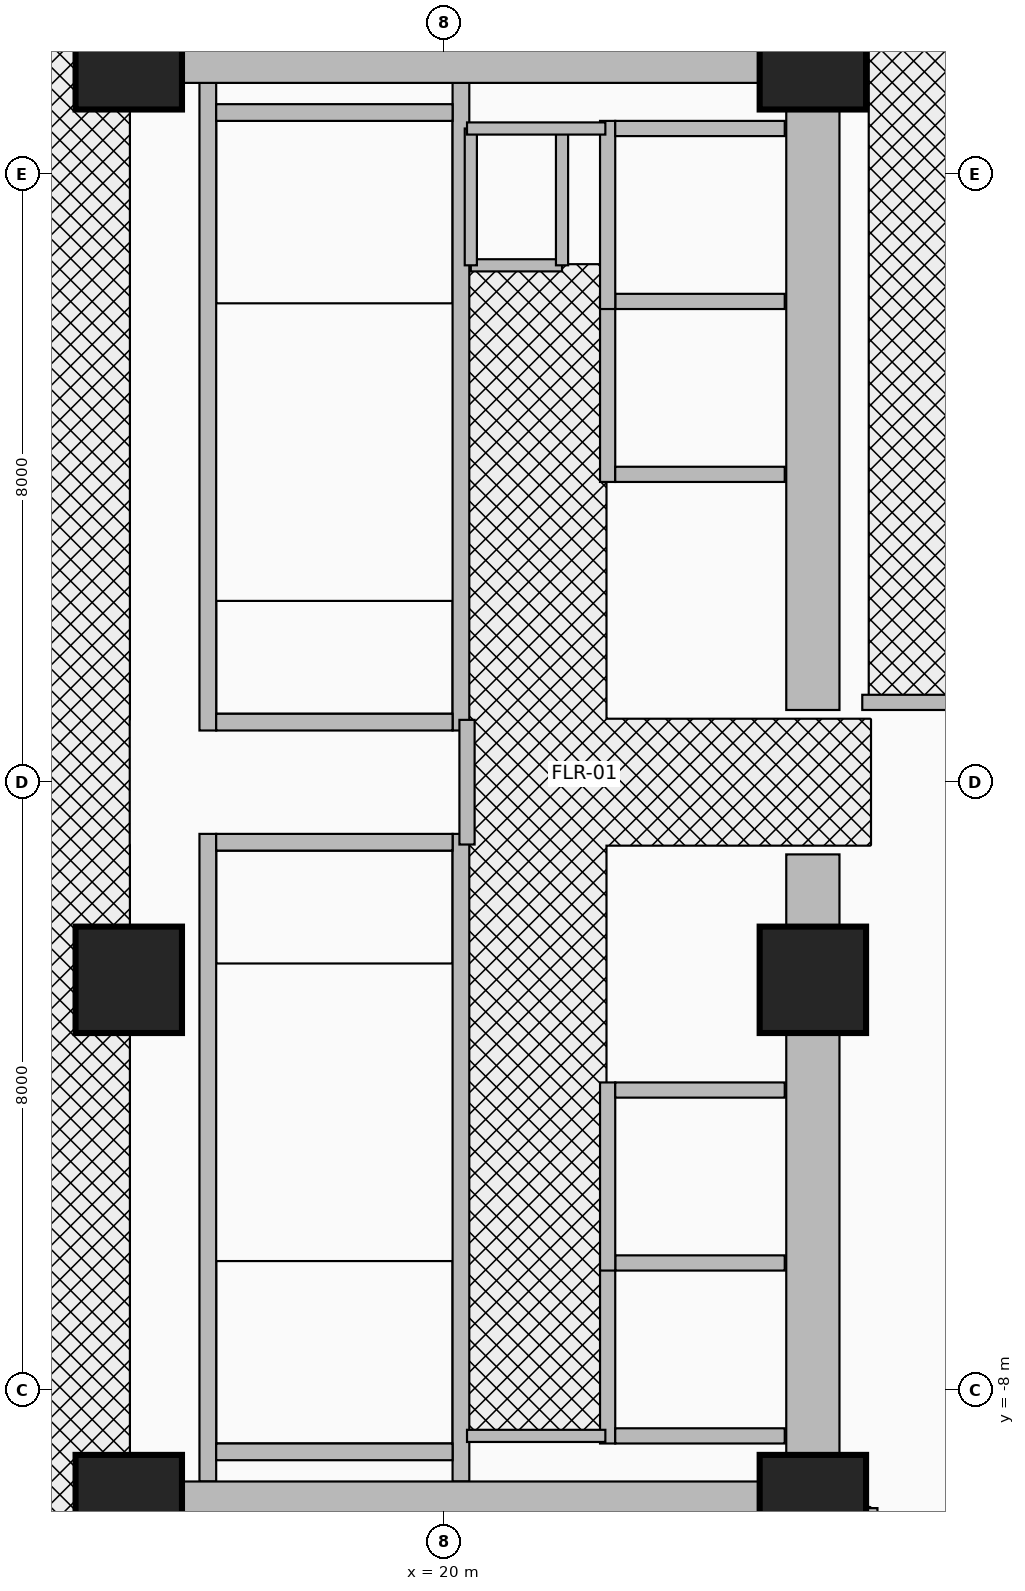
"""IFC4 building model, lengths in metres.
Left out: names, types, materials, properties, quantities, classifications, styles, units other than length and angle.
Written with IfcOpenShell. Run it as: python <this file> out.ifc"""

import sys

from ifc_helpers import new_model, si_unit, direction, frame, frame_2d, origin, origin_2d, place, context, subcontext, project, spatial, rectangle, extrude, source, transform, mapped, element, fill, save


model = new_model("IFC4")
c1 = context("Model", 3, precision=1e-05, world=origin(), true_north=direction((0.0, 1.0)))
c2 = subcontext(c1, "Body", "Model", "MODEL_VIEW")
j1 = project(units=[si_unit("LENGTHUNIT", "METRE"), si_unit("PLANEANGLEUNIT", "RADIAN")], contexts=[c1])
p1 = place(None, origin())
s1 = spatial("IfcSite", under=j1, at=p1, CompositionType="ELEMENT")
p2 = place(p1, origin())
s2 = spatial("IfcBuilding", under=s1, at=p2, CompositionType="ELEMENT")
p3 = place(p2, origin())
s3 = spatial("IfcBuildingStorey", under=s2, at=p3, CompositionType="ELEMENT", Elevation=0.0)
for number, where, z_axis, x_axis in (
    (1, (16.89, 0.68, 0.0), (0.0, 0.0, 1.0), (0.0, 1.0, 0.0)),
    (2, (20.22, 0.68, 0.0), (0.0, 0.0, 1.0), (0.0, 1.0, 0.0)),
):
    element("IfcWall", number, at=place(p3, frame(where, z_axis=z_axis, x_axis=x_axis)), inside=s3, PredefinedType="SHEAR", context=c2, shape_type="SweptSolid", body=[
        extrude(rectangle(XDim=8.52, YDim=0.22, at=frame_2d((4.26, 0.0))), origin(), (0.0, 0.0, 1.0), 4.92),
    ])
p4 = place(p3, frame((17.0, 0.79, 0.0), z_axis=(0.0, 0.0, 1.0), x_axis=(1.0, 0.0, 0.0)))
e3 = element("IfcWall", 3, at=p4, inside=s3, PredefinedType="SHEAR", context=c2, shape_type="SweptSolid", body=[
    extrude(rectangle(XDim=3.11, YDim=0.22, at=frame_2d((1.555, 0.0))), origin(), (0.0, 0.0, 1.0), 4.92),
])
p5 = place(p4, frame((0.95, 0.0, 0.0)))
e4 = element("IfcOpeningElement", 4, at=p5, cuts=e3, PredefinedType="OPENING", context=c2, shape_type="SweptSolid", body=[
    extrude(rectangle(XDim=1.1, YDim=2.15, at=frame_2d((0.55, 1.075))), frame((0.0, 0.125, 0.0), z_axis=(0.0, -1.0, 0.0), x_axis=(1.0, 0.0, 0.0)), (0.0, 0.0, 1.0), 0.25),
])
p6 = place(p3, frame((17.0, 8.81, 0.0), z_axis=(0.0, 0.0, 1.0), x_axis=(1.0, 0.0, 0.0)))
e5 = element("IfcWall", 5, at=p6, inside=s3, PredefinedType="SHEAR", context=c2, shape_type="SweptSolid", body=[
    extrude(rectangle(XDim=3.11, YDim=0.22, at=frame_2d((1.555, 0.0))), origin(), (0.0, 0.0, 1.0), 4.92),
])
for number, where, z_axis, x_axis in (
    (6, (16.89, -9.2, 0.0), (0.0, 0.0, 1.0), (0.0, 1.0, 0.0)),
    (7, (20.22, -9.2, 0.0), (0.0, 0.0, 1.0), (0.0, 1.0, 0.0)),
):
    element("IfcWall", number, at=place(p3, frame(where, z_axis=z_axis, x_axis=x_axis)), inside=s3, PredefinedType="SHEAR", context=c2, shape_type="SweptSolid", body=[
        extrude(rectangle(XDim=8.52, YDim=0.22, at=frame_2d((4.26, 0.0))), origin(), (0.0, 0.0, 1.0), 4.92),
    ])
p7 = place(p3, frame((17.0, -8.81, 0.0), z_axis=(0.0, 0.0, 1.0), x_axis=(1.0, 0.0, 0.0)))
e8 = element("IfcWall", 8, at=p7, inside=s3, PredefinedType="SHEAR", context=c2, shape_type="SweptSolid", body=[
    extrude(rectangle(XDim=3.11, YDim=0.22, at=frame_2d((1.555, 0.0))), origin(), (0.0, 0.0, 1.0), 4.92),
])
p8 = place(p3, frame((17.0, -0.79, 0.0), z_axis=(0.0, 0.0, 1.0), x_axis=(1.0, 0.0, 0.0)))
e9 = element("IfcWall", 9, at=p8, inside=s3, PredefinedType="SHEAR", context=c2, shape_type="SweptSolid", body=[
    extrude(rectangle(XDim=3.11, YDim=0.22, at=frame_2d((1.555, 0.0))), origin(), (0.0, 0.0, 1.0), 4.92),
])
p9 = place(p8, frame((0.95, 0.0, 0.0)))
e10 = element("IfcOpeningElement", 10, at=p9, cuts=e9, PredefinedType="OPENING", context=c2, shape_type="SweptSolid", body=[
    extrude(rectangle(XDim=1.1, YDim=2.15, at=frame_2d((0.55, 1.075))), frame((0.0, 0.125, 0.0), z_axis=(0.0, -1.0, 0.0), x_axis=(1.0, 0.0, 0.0)), (0.0, 0.0, 1.0), 0.25),
])
for number, where, z_axis, x_axis in (
    (11, (24.85, -9.9, 0.0), (0.0, 0.0, 1.0), (0.0, 1.0, 0.0)),
    (12, (24.85, 0.95, 0.0), (0.0, 0.0, 1.0), (0.0, 1.0, 0.0)),
):
    element("IfcWall", number, at=place(p3, frame(where, z_axis=z_axis, x_axis=x_axis)), inside=s3, PredefinedType="SHEAR", context=c2, shape_type="SweptSolid", body=[
        extrude(rectangle(XDim=8.95, YDim=0.7, at=frame_2d((4.475, 0.0))), origin(), (0.0, 0.0, 1.0), 4.92),
    ])
for number, where, z_axis, x_axis in (
    (13, (15.85, 9.55, 0.0), (0.0, 0.0, 1.0), (1.0, 0.0, 0.0)),
    (14, (15.85, -9.55, 0.0), (0.0, 0.0, 1.0), (1.0, 0.0, 0.0)),
):
    element("IfcWall", number, at=place(p3, frame(where, z_axis=z_axis, x_axis=x_axis)), inside=s3, PredefinedType="SHEAR", context=c2, shape_type="SweptSolid", body=[
        extrude(rectangle(XDim=9.0, YDim=0.7, at=frame_2d((4.5, 0.0))), origin(), (0.0, 0.0, 1.0), 4.92),
    ])
m1 = source(origin(), c2, "Body", "SweptSolid", [
    extrude(rectangle(XDim=1.4, YDim=1.4, at=origin_2d()), origin(), (0.0, 0.0, 1.0), 5.2),
])
for number, where, z_axis, x_axis in (
    (15, (15.85, -9.55, 0.0), (0.0, 0.0, 1.0), (1.0, 0.0, 0.0)),
    (16, (24.85, -9.55, 0.0), (0.0, 0.0, 1.0), (1.0, 0.0, 0.0)),
    (17, (15.85, -2.6, 0.0), (0.0, 0.0, 1.0), (1.0, 0.0, 0.0)),
    (18, (24.85, -2.6, 0.0), (0.0, 0.0, 1.0), (1.0, 0.0, 0.0)),
    (19, (15.85, 9.55, 0.0), (0.0, 0.0, 1.0), (1.0, 0.0, 0.0)),
    (20, (24.85, 9.55, 0.0), (0.0, 0.0, 1.0), (1.0, 0.0, 0.0)),
):
    element("IfcColumn", number, at=place(p3, frame(where, z_axis=z_axis, x_axis=x_axis)), inside=s3, PredefinedType="COLUMN", context=c2, shape_type="MappedRepresentation", body=[
        mapped(m1, transform((0.0, 0.0, 0.0), x_axis=(1.0, 0.0, 0.0), y_axis=(0.0, 1.0, 0.0), z_axis=(0.0, 0.0, 1.0), scale=1.0)),
    ])
p10 = place(p3, frame((22.15, -8.7, 0.0), z_axis=(0.0, 0.0, 1.0), x_axis=(0.0, 1.0, 0.0)))
e21 = element("IfcWall", 21, at=p10, inside=s3, PredefinedType="MOVABLE", context=c2, shape_type="SweptSolid", body=[
    extrude(rectangle(XDim=2.475, YDim=0.2, at=frame_2d((1.237, 0.0))), origin(), (0.0, 0.0, 1.0), 4.92),
])
p11 = place(p10, frame((0.688, 0.0, 0.0)))
e22 = element("IfcOpeningElement", 22, at=p11, cuts=e21, PredefinedType="OPENING", context=c2, shape_type="SweptSolid", body=[
    extrude(rectangle(XDim=1.1, YDim=2.1, at=frame_2d((0.55, 1.05))), frame((0.0, 0.115, 0.0), z_axis=(0.0, -1.0, 0.0), x_axis=(1.0, 0.0, 0.0)), (0.0, 0.0, 1.0), 0.23),
])
for number, where, z_axis, x_axis in (
    (23, (22.25, -8.6, 0.0), (0.0, 0.0, 1.0), (1.0, 0.0, 0.0)),
    (24, (22.25, -6.325, 0.0), (0.0, 0.0, 1.0), (1.0, 0.0, 0.0)),
):
    element("IfcWall", number, at=place(p3, frame(where, z_axis=z_axis, x_axis=x_axis)), inside=s3, PredefinedType="MOVABLE", context=c2, shape_type="SweptSolid", body=[
        extrude(rectangle(XDim=2.23, YDim=0.2, at=frame_2d((1.115, 0.0))), origin(), (0.0, 0.0, 1.0), 4.92),
    ])
p12 = place(p3, frame((22.15, -6.425, 0.0), z_axis=(0.0, 0.0, 1.0), x_axis=(0.0, 1.0, 0.0)))
e25 = element("IfcWall", 25, at=p12, inside=s3, PredefinedType="MOVABLE", context=c2, shape_type="SweptSolid", body=[
    extrude(rectangle(XDim=2.475, YDim=0.2, at=frame_2d((1.238, 0.0))), origin(), (0.0, 0.0, 1.0), 4.92),
])
p13 = place(p12, frame((0.688, 0.0, 0.0)))
e26 = element("IfcOpeningElement", 26, at=p13, cuts=e25, PredefinedType="OPENING", context=c2, shape_type="SweptSolid", body=[
    extrude(rectangle(XDim=1.1, YDim=2.1, at=frame_2d((0.55, 1.05))), frame((0.0, 0.115, 0.0), z_axis=(0.0, -1.0, 0.0), x_axis=(1.0, 0.0, 0.0)), (0.0, 0.0, 1.0), 0.23),
])
p14 = place(p3, frame((22.25, -4.05, 0.0), z_axis=(0.0, 0.0, 1.0), x_axis=(1.0, 0.0, 0.0)))
e27 = element("IfcWall", 27, at=p14, inside=s3, PredefinedType="MOVABLE", context=c2, shape_type="SweptSolid", body=[
    extrude(rectangle(XDim=2.23, YDim=0.2, at=frame_2d((1.115, 0.0))), origin(), (0.0, 0.0, 1.0), 4.92),
])
p15 = place(p3, frame((22.15, 3.95, 0.0), z_axis=(0.0, 0.0, 1.0), x_axis=(0.0, 1.0, 0.0)))
e28 = element("IfcWall", 28, at=p15, inside=s3, PredefinedType="MOVABLE", context=c2, shape_type="SweptSolid", body=[
    extrude(rectangle(XDim=2.475, YDim=0.2, at=frame_2d((1.238, 0.0))), origin(), (0.0, 0.0, 1.0), 4.92),
])
p16 = place(p15, frame((0.688, 0.0, 0.0)))
e29 = element("IfcOpeningElement", 29, at=p16, cuts=e28, PredefinedType="OPENING", context=c2, shape_type="SweptSolid", body=[
    extrude(rectangle(XDim=1.1, YDim=2.1, at=frame_2d((0.55, 1.05))), frame((0.0, 0.115, 0.0), z_axis=(0.0, -1.0, 0.0), x_axis=(1.0, 0.0, 0.0)), (0.0, 0.0, 1.0), 0.23),
])
for number, where, z_axis, x_axis in (
    (30, (22.25, 4.05, 0.0), (0.0, 0.0, 1.0), (1.0, 0.0, 0.0)),
    (31, (22.25, 6.325, 0.0), (0.0, 0.0, 1.0), (1.0, 0.0, 0.0)),
):
    element("IfcWall", number, at=place(p3, frame(where, z_axis=z_axis, x_axis=x_axis)), inside=s3, PredefinedType="MOVABLE", context=c2, shape_type="SweptSolid", body=[
        extrude(rectangle(XDim=2.23, YDim=0.2, at=frame_2d((1.115, 0.0))), origin(), (0.0, 0.0, 1.0), 3.745),
    ])
p17 = place(p3, frame((22.15, 6.225, 0.0), z_axis=(0.0, 0.0, 1.0), x_axis=(0.0, 1.0, 0.0)))
e32 = element("IfcWall", 32, at=p17, inside=s3, PredefinedType="MOVABLE", context=c2, shape_type="SweptSolid", body=[
    extrude(rectangle(XDim=2.475, YDim=0.2, at=frame_2d((1.237, 0.0))), origin(), (0.0, 0.0, 1.0), 4.92),
])
p18 = place(p17, frame((0.688, 0.0, 0.0)))
e33 = element("IfcOpeningElement", 33, at=p18, cuts=e32, PredefinedType="OPENING", context=c2, shape_type="SweptSolid", body=[
    extrude(rectangle(XDim=1.1, YDim=2.1, at=frame_2d((0.55, 1.05))), frame((0.0, 0.115, 0.0), z_axis=(0.0, -1.0, 0.0), x_axis=(1.0, 0.0, 0.0)), (0.0, 0.0, 1.0), 0.23),
])
p19 = place(p3, frame((22.25, 8.6, 0.0), z_axis=(0.0, 0.0, 1.0), x_axis=(1.0, 0.0, 0.0)))
e34 = element("IfcWall", 34, at=p19, inside=s3, PredefinedType="MOVABLE", context=c2, shape_type="SweptSolid", body=[
    extrude(rectangle(XDim=2.23, YDim=0.2, at=frame_2d((1.115, 0.0))), origin(), (0.0, 0.0, 1.0), 3.745),
])
p20 = place(p3, frame((20.3, -0.82, 0.0), z_axis=(0.0, 0.0, 1.0), x_axis=(0.0, 1.0, 0.0)))
e35 = element("IfcWall", 35, at=p20, inside=s3, PredefinedType="PARTITIONING", context=c2, shape_type="SweptSolid", body=[
    extrude(rectangle(XDim=1.64, YDim=0.2, at=frame_2d((0.82, 0.0))), origin(), (0.0, 0.0, 1.0), 4.92),
])
p21 = place(p20, frame((0.295, 0.0, 0.0)))
e36 = element("IfcOpeningElement", 36, at=p21, cuts=e35, PredefinedType="OPENING", context=c2, shape_type="SweptSolid", body=[
    extrude(rectangle(XDim=1.05, YDim=2.15, at=frame_2d((0.525, 1.075))), frame((0.0, 0.115, 0.0), z_axis=(0.0, -1.0, 0.0), x_axis=(1.0, 0.0, 0.0)), (0.0, 0.0, 1.0), 0.23),
])
p22 = place(p3, frame((20.35, 6.8, 0.0), z_axis=(0.0, 0.0, 1.0), x_axis=(1.0, 0.0, 0.0)))
e37 = element("IfcWall", 37, at=p22, inside=s3, PredefinedType="PARTITIONING", context=c2, shape_type="SweptSolid", body=[
    extrude(rectangle(XDim=1.2, YDim=0.16, at=frame_2d((0.6, 0.0))), origin(), (0.0, 0.0, 1.0), 4.92),
])
p23 = place(p22, frame((0.175, 0.0, 0.0)))
e38 = element("IfcOpeningElement", 38, at=p23, cuts=e37, PredefinedType="OPENING", context=c2, shape_type="SweptSolid", body=[
    extrude(rectangle(XDim=0.85, YDim=2.05, at=frame_2d((0.425, 1.025))), frame((0.0, 0.095, 0.0), z_axis=(0.0, -1.0, 0.0), x_axis=(1.0, 0.0, 0.0)), (0.0, 0.0, 1.0), 0.19),
])
for number, where, z_axis, x_axis in (
    (39, (21.55, 6.8, 0.0), (0.0, 0.0, 1.0), (0.0, 1.0, 0.0)),
    (40, (20.35, 6.8, 0.0), (0.0, 0.0, 1.0), (0.0, 1.0, 0.0)),
):
    element("IfcWall", number, at=place(p3, frame(where, z_axis=z_axis, x_axis=x_axis)), inside=s3, PredefinedType="PARTITIONING", context=c2, shape_type="SweptSolid", body=[
        extrude(rectangle(XDim=1.8, YDim=0.16, at=frame_2d((0.9, 0.0))), origin(), (0.0, 0.0, 1.0), 4.92),
    ])
for number, where, z_axis, x_axis in (
    (41, (20.3, -8.6, 0.0), (0.0, 0.0, 1.0), (1.0, 0.0, 0.0)),
    (42, (20.3, 8.6, 0.0), (0.0, 0.0, 1.0), (1.0, 0.0, 0.0)),
):
    element("IfcWall", number, at=place(p3, frame(where, z_axis=z_axis, x_axis=x_axis)), inside=s3, PredefinedType="PARTITIONING", context=c2, shape_type="SweptSolid", body=[
        extrude(rectangle(XDim=1.82, YDim=0.16, at=frame_2d((0.91, 0.0))), origin(), (0.0, 0.0, 1.0), 4.92),
    ])
p24 = place(p3, frame((25.5, 1.05, 0.0), z_axis=(0.0, 0.0, 1.0), x_axis=(1.0, 0.0, 0.0)))
e43 = element("IfcWall", 43, at=p24, inside=s3, PredefinedType="PARTITIONING", context=c2, shape_type="SweptSolid", body=[
    extrude(rectangle(XDim=2.1, YDim=0.2, at=frame_2d((1.05, 0.0))), origin(), (0.0, 0.0, 1.0), 4.92),
])
p25 = place(p24, frame((0.5, 0.0, 0.0)))
e44 = element("IfcOpeningElement", 44, at=p25, cuts=e43, PredefinedType="OPENING", context=c2, shape_type="SweptSolid", body=[
    extrude(rectangle(XDim=1.05, YDim=2.15, at=frame_2d((0.525, 1.075))), frame((0.0, 0.115, 0.0), z_axis=(0.0, -1.0, 0.0), x_axis=(1.0, 0.0, 0.0)), (0.0, 0.0, 1.0), 0.23),
])
p26 = place(p3, frame((25.6, -22.74, 0.0), z_axis=(0.0, 0.0, 1.0), x_axis=(0.0, 1.0, 0.0)))
e45 = element("IfcWall", 45, at=p26, inside=s3, PredefinedType="PARTITIONING", context=c2, shape_type="SweptSolid", body=[
    extrude(rectangle(XDim=13.19, YDim=0.2, at=frame_2d((6.595, 0.0))), origin(), (0.0, 0.0, 1.0), 3.957),
])
p27 = place(p11, origin())
e46 = element("IfcDoor", 46, at=p27, inside=s3, OperationType="DOUBLE_DOOR_SLIDING", PredefinedType="DOOR", context=c2, shape_type="SweptSolid", body=[
    extrude(rectangle(XDim=1.1, YDim=2.1, at=frame_2d((0.55, 1.05))), frame((0.0, 0.025, 0.0), z_axis=(0.0, -1.0, 0.0), x_axis=(1.0, 0.0, 0.0)), (0.0, 0.0, 1.0), 0.05),
])
fill(e22, e46)
p28 = place(p13, origin())
e47 = element("IfcDoor", 47, at=p28, inside=s3, OperationType="DOUBLE_DOOR_SLIDING", PredefinedType="DOOR", context=c2, shape_type="SweptSolid", body=[
    extrude(rectangle(XDim=1.1, YDim=2.1, at=frame_2d((0.55, 1.05))), frame((0.0, 0.025, 0.0), z_axis=(0.0, -1.0, 0.0), x_axis=(1.0, 0.0, 0.0)), (0.0, 0.0, 1.0), 0.05),
])
fill(e26, e47)
p29 = place(p16, origin())
e48 = element("IfcDoor", 48, at=p29, inside=s3, OperationType="DOUBLE_DOOR_SLIDING", PredefinedType="DOOR", context=c2, shape_type="SweptSolid", body=[
    extrude(rectangle(XDim=1.1, YDim=2.1, at=frame_2d((0.55, 1.05))), frame((0.0, 0.025, 0.0), z_axis=(0.0, -1.0, 0.0), x_axis=(1.0, 0.0, 0.0)), (0.0, 0.0, 1.0), 0.05),
])
fill(e29, e48)
p30 = place(p18, origin())
e49 = element("IfcDoor", 49, at=p30, inside=s3, OperationType="DOUBLE_DOOR_SLIDING", PredefinedType="DOOR", context=c2, shape_type="SweptSolid", body=[
    extrude(rectangle(XDim=1.1, YDim=2.1, at=frame_2d((0.55, 1.05))), frame((0.0, 0.025, 0.0), z_axis=(0.0, -1.0, 0.0), x_axis=(1.0, 0.0, 0.0)), (0.0, 0.0, 1.0), 0.05),
])
fill(e33, e49)
p31 = place(p21, origin())
e50 = element("IfcDoor", 50, at=p31, inside=s3, OperationType="SINGLE_SWING_RIGHT", PredefinedType="DOOR", context=c2, shape_type="SweptSolid", body=[
    extrude(rectangle(XDim=1.05, YDim=2.15, at=frame_2d((0.525, 1.075))), frame((0.0, 0.025, 0.0), z_axis=(0.0, -1.0, 0.0), x_axis=(1.0, 0.0, 0.0)), (0.0, 0.0, 1.0), 0.05),
])
fill(e36, e50)
p32 = place(p5, frame((1.1, 0.0, 0.0), z_axis=(0.0, 0.0, 1.0), x_axis=(-1.0, 0.0, 0.0)))
e51 = element("IfcDoor", 51, at=p32, inside=s3, OperationType="SINGLE_SWING_LEFT", PredefinedType="DOOR", context=c2, shape_type="SweptSolid", body=[
    extrude(rectangle(XDim=1.1, YDim=2.15, at=frame_2d((0.55, 1.075))), frame((0.0, 0.025, 0.0), z_axis=(0.0, -1.0, 0.0), x_axis=(1.0, 0.0, 0.0)), (0.0, 0.0, 1.0), 0.05),
])
fill(e4, e51)
p33 = place(p9, origin())
e52 = element("IfcDoor", 52, at=p33, inside=s3, OperationType="SINGLE_SWING_RIGHT", PredefinedType="DOOR", context=c2, shape_type="SweptSolid", body=[
    extrude(rectangle(XDim=1.1, YDim=2.15, at=frame_2d((0.55, 1.075))), frame((0.0, 0.025, 0.0), z_axis=(0.0, -1.0, 0.0), x_axis=(1.0, 0.0, 0.0)), (0.0, 0.0, 1.0), 0.05),
])
fill(e10, e52)
p34 = place(p23, origin())
e53 = element("IfcDoor", 53, at=p34, inside=s3, OperationType="SINGLE_SWING_LEFT", PredefinedType="DOOR", context=c2, shape_type="SweptSolid", body=[
    extrude(rectangle(XDim=0.85, YDim=2.05, at=frame_2d((0.425, 1.025))), frame((0.0, 0.025, 0.0), z_axis=(0.0, -1.0, 0.0), x_axis=(1.0, 0.0, 0.0)), (0.0, 0.0, 1.0), 0.05),
])
fill(e38, e53)
p35 = place(p25, frame((1.05, 0.0, 0.0), z_axis=(0.0, 0.0, 1.0), x_axis=(-1.0, 0.0, 0.0)))
e54 = element("IfcDoor", 54, at=p35, inside=s3, OperationType="SINGLE_SWING_RIGHT", PredefinedType="DOOR", context=c2, shape_type="SweptSolid", body=[
    extrude(rectangle(XDim=1.05, YDim=2.15, at=frame_2d((0.525, 1.075))), frame((0.0, 0.025, 0.0), z_axis=(0.0, -1.0, 0.0), x_axis=(1.0, 0.0, 0.0)), (0.0, 0.0, 1.0), 0.05),
])
fill(e44, e54)
save(model, sys.argv[1])
